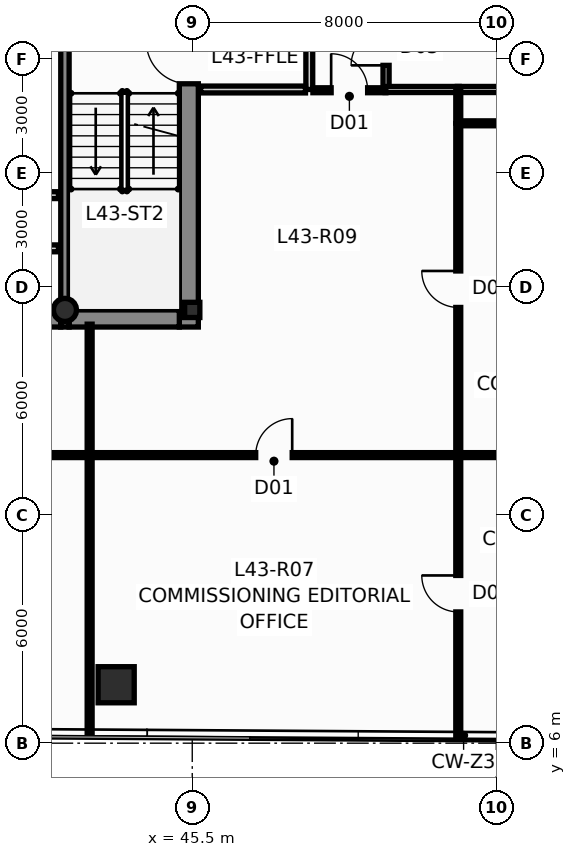
"""IFC4 building model, lengths in metres.
Left out: names, types, materials, properties, quantities, classifications, styles, units other than length and angle.
Written with IfcOpenShell. Run it as: python <this file> out.ifc"""

import sys

from ifc_helpers import new_model, si_unit, direction, frame, frame_2d, origin, origin_2d, place, context, subcontext, project, spatial, rectangle, hollow_rectangle, hollow_circle, i_section, extrude, source, transform, mapped, element, fill, save


model = new_model("IFC4")
c1 = context("Model", 3, precision=1e-05, world=origin(), true_north=direction((0.0, 1.0)))
c2 = subcontext(c1, "Body", "Model", "MODEL_VIEW")
j1 = project(units=[si_unit("LENGTHUNIT", "METRE"), si_unit("PLANEANGLEUNIT", "RADIAN")], contexts=[c1])
p1 = place(None, origin())
s1 = spatial("IfcSite", under=j1, at=p1, CompositionType="ELEMENT")
p2 = place(p1, origin())
s2 = spatial("IfcBuilding", under=s1, at=p2, CompositionType="ELEMENT")
p3 = place(p2, frame((0.0, 0.0, 165.8)))
s3 = spatial("IfcBuildingStorey", under=s2, at=p3, CompositionType="ELEMENT", Elevation=165.8)
m1 = source(origin(), c2, "Body", "SweptSolid", [
    extrude(i_section(OverallWidth=0.4, OverallDepth=0.4, WebThickness=0.02, FlangeThickness=0.032, at=origin_2d()), origin(), (0.0, 0.0, 1.0), 3.65),
])
p4 = place(p3, frame((45.5, 17.4, 0.0), z_axis=(0.0, 0.0, 1.0), x_axis=(1.0, 0.0, 0.0)))
e1 = element("IfcColumn", 1, at=p4, inside=s3, PredefinedType="COLUMN", context=c2, shape_type="MappedRepresentation", body=[
    mapped(m1, transform((0.0, 0.0, 0.0), scale=1.0)),
])
m2 = source(origin(), c2, "Body", "SweptSolid", [
    extrude(hollow_circle(Radius=0.305, WallThickness=0.025, at=origin_2d()), origin(), (0.0, 0.0, 1.0), 3.65),
])
p5 = place(p3, frame((42.15, 17.4, 0.0), z_axis=(0.0, 0.0, 1.0), x_axis=(1.0, 0.0, 0.0)))
e2 = element("IfcColumn", 2, at=p5, inside=s3, PredefinedType="COLUMN", context=c2, shape_type="MappedRepresentation", body=[
    mapped(m2, transform((0.0, 0.0, 0.0), scale=1.0)),
])
p6 = place(p3, frame((45.41, 16.95, 0.0), z_axis=(0.0, 0.0, 1.0), x_axis=(0.0, 1.0, 0.0)))
e3 = element("IfcWall", 3, at=p6, inside=s3, PredefinedType="SHEAR", context=c2, shape_type="SweptSolid", body=[
    extrude(rectangle(XDim=13.275, YDim=0.5, at=frame_2d((6.638, 0.0))), origin(), (0.0, 0.0, 1.0), 3.65),
])
p7 = place(p6, frame((6.4, 0.0, 0.0)))
e4 = element("IfcOpeningElement", 4, at=p7, cuts=e3, PredefinedType="OPENING", context=c2, shape_type="SweptSolid", body=[
    extrude(rectangle(XDim=1.12, YDim=2.15, at=frame_2d((0.56, 1.075))), frame((0.0, 0.262, 0.0), z_axis=(0.0, -1.0, 0.0), x_axis=(1.0, 0.0, 0.0)), (0.0, 0.0, 1.0), 0.524),
])
p8 = place(p6, frame((10.85, 0.0, 0.0)))
e5 = element("IfcOpeningElement", 5, at=p8, cuts=e3, PredefinedType="OPENING", context=c2, shape_type="SweptSolid", body=[
    extrude(rectangle(XDim=1.2, YDim=2.2, at=frame_2d((0.6, 1.1))), frame((0.0, 0.262, 0.0), z_axis=(0.0, -1.0, 0.0), x_axis=(1.0, 0.0, 0.0)), (0.0, 0.0, 1.0), 0.524),
])
p9 = place(p3, frame((33.96, 17.175, 0.0), z_axis=(0.0, 0.0, 1.0), x_axis=(1.0, 0.0, 0.0)))
e6 = element("IfcWall", 6, at=p9, inside=s3, PredefinedType="SHEAR", context=c2, shape_type="SweptSolid", body=[
    extrude(rectangle(XDim=8.08, YDim=0.45, at=frame_2d((4.04, 0.0))), origin(), (0.0, 0.0, 1.0), 3.65),
])
p10 = place(p3, frame((42.26, 17.175, 0.0), z_axis=(0.0, 0.0, 1.0), x_axis=(1.0, 0.0, 0.0)))
e7 = element("IfcWall", 7, at=p10, inside=s3, PredefinedType="SHEAR", context=c2, shape_type="SweptSolid", body=[
    extrude(rectangle(XDim=2.9, YDim=0.45, at=frame_2d((1.45, 0.0))), origin(), (0.0, 0.0, 1.0), 3.65),
])
p11 = place(p3, frame((42.15, 16.95, 0.0), z_axis=(0.0, 0.0, 1.0), x_axis=(0.0, 1.0, 0.0)))
e8 = element("IfcWall", 8, at=p11, inside=s3, PredefinedType="SHEAR", context=c2, shape_type="SweptSolid", body=[
    extrude(rectangle(XDim=13.275, YDim=0.22, at=frame_2d((6.638, 0.0))), origin(), (0.0, 0.0, 1.0), 3.65),
])
m3 = source(origin(), c2, "Body", "SweptSolid", [
    extrude(hollow_rectangle(XDim=0.95, YDim=0.95, WallThickness=0.05, at=origin_2d()), origin(), (0.0, 0.0, 1.0), 3.651),
])
p12 = place(p3, frame((43.498, 7.537, 0.0), z_axis=(0.004547556686, 0.019795246753, 0.99979371269), x_axis=(-0.974612694662, 0.223897510936, 0.0)))
e9 = element("IfcColumn", 9, at=p12, inside=s3, PredefinedType="COLUMN", context=c2, shape_type="MappedRepresentation", body=[
    mapped(m3, transform((0.0, 0.0, 0.0), scale=1.0)),
])
p13 = place(p3, frame((48.58, 23.2, 0.0), z_axis=(0.0, 0.0, 1.0), x_axis=(0.0, 1.0, 0.0)))
e10 = element("IfcWall", 10, at=p13, inside=s3, PredefinedType="PARTITIONING", context=c2, shape_type="SweptSolid", body=[
    extrude(rectangle(XDim=6.4, YDim=0.18, at=frame_2d((3.2, 0.0))), origin(), (0.0, 0.0, 1.0), 3.078),
])
p14 = place(p13, frame((2.65, 0.0, 0.0)))
e11 = element("IfcOpeningElement", 11, at=p14, cuts=e10, PredefinedType="OPENING", context=c2, shape_type="SweptSolid", body=[
    extrude(rectangle(XDim=1.05, YDim=2.15, at=frame_2d((0.525, 1.075))), frame((0.0, 0.102, 0.0), z_axis=(0.0, -1.0, 0.0), x_axis=(1.0, 0.0, 0.0)), (0.0, 0.0, 1.0), 0.204),
])
p15 = place(p3, frame((45.72, 23.2, 0.0), z_axis=(0.0, 0.0, 1.0), x_axis=(1.0, 0.0, 0.0)))
e12 = element("IfcWall", 12, at=p15, inside=s3, PredefinedType="PARTITIONING", context=c2, shape_type="SweptSolid", body=[
    extrude(rectangle(XDim=2.76, YDim=0.18, at=frame_2d((1.38, 0.0))), origin(), (0.0, 0.0, 1.0), 3.4),
])
p16 = place(p3, frame((40.22, 20.42, 0.0), z_axis=(0.0, 0.0, 1.0), x_axis=(1.0, 0.0, 0.0)))
e13 = element("IfcWall", 13, at=p16, inside=s3, PredefinedType="PARTITIONING", context=c2, shape_type="SweptSolid", body=[
    extrude(rectangle(XDim=1.76, YDim=0.18, at=frame_2d((0.88, 0.0))), origin(), (0.0, 0.0, 1.0), 3.4),
])
p17 = place(p3, frame((40.28, 19.02, 0.0), z_axis=(0.0, 0.0, 1.0), x_axis=(1.0, 0.0, 0.0)))
e14 = element("IfcWall", 14, at=p17, inside=s3, PredefinedType="PARTITIONING", context=c2, shape_type="SweptSolid", body=[
    extrude(rectangle(XDim=1.7, YDim=0.18, at=frame_2d((0.85, 0.0))), origin(), (0.0, 0.0, 1.0), 3.4),
])
p18 = place(p3, frame((50.6, 23.175, 0.0), z_axis=(0.0, 0.0, 1.0), x_axis=(0.0, 1.0, 0.0)))
e15 = element("IfcWall", 15, at=p18, inside=s3, PredefinedType="PLUMBINGWALL", context=c2, shape_type="SweptSolid", body=[
    extrude(rectangle(XDim=2.3, YDim=0.16, at=frame_2d((1.15, 0.0))), origin(), (0.0, 0.0, 1.0), 3.078),
])
p19 = place(p18, frame((0.66, 0.0, 0.0)))
e16 = element("IfcOpeningElement", 16, at=p19, cuts=e15, PredefinedType="OPENING", context=c2, shape_type="SweptSolid", body=[
    extrude(rectangle(XDim=0.92, YDim=2.1, at=frame_2d((0.46, 1.05))), frame((0.0, 0.092, 0.0), z_axis=(0.0, -1.0, 0.0), x_axis=(1.0, 0.0, 0.0)), (0.0, 0.0, 1.0), 0.184),
])
p20 = place(p3, frame((50.575, 23.2, 0.0), z_axis=(0.0, 0.0, 1.0), x_axis=(1.0, 0.0, 0.0)))
e17 = element("IfcWall", 17, at=p20, inside=s3, PredefinedType="PLUMBINGWALL", context=c2, shape_type="SweptSolid", body=[
    extrude(rectangle(XDim=1.95, YDim=0.16, at=frame_2d((0.975, 0.0))), origin(), (0.0, 0.0, 1.0), 3.4),
])
p21 = place(p3, frame((52.475, 23.2, 0.0), z_axis=(0.0, 0.0, 1.0), x_axis=(1.0, 0.0, 0.0)))
e18 = element("IfcWall", 18, at=p21, inside=s3, PredefinedType="PLUMBINGWALL", context=c2, shape_type="SweptSolid", body=[
    extrude(rectangle(XDim=1.35, YDim=0.16, at=frame_2d((0.675, 0.0))), origin(), (0.0, 0.0, 1.0), 3.4),
])
p22 = place(p3, frame((52.505, 13.58, 0.0), z_axis=(0.0, 0.0, 1.0), x_axis=(1.0, 0.0, 0.0)))
e19 = element("IfcWall", 19, at=p22, inside=s3, PredefinedType="PARTITIONING", context=c2, shape_type="SweptSolid", body=[
    extrude(rectangle(XDim=12.027, YDim=0.13, at=frame_2d((6.013, 0.0))), origin(), (0.0, 0.0, 1.0), 3.4),
])
p23 = place(p3, frame((42.805, 13.58, 0.0), z_axis=(0.0, 0.0, 1.0), x_axis=(1.0, 0.0, 0.0)))
e20 = element("IfcWall", 20, at=p23, inside=s3, PredefinedType="PARTITIONING", context=c2, shape_type="SweptSolid", body=[
    extrude(rectangle(XDim=9.69, YDim=0.13, at=frame_2d((4.845, 0.0))), origin(), (0.0, 0.0, 1.0), 3.078),
])
p24 = place(p23, frame((4.365, 0.0, 0.0)))
e21 = element("IfcOpeningElement", 21, at=p24, cuts=e20, PredefinedType="OPENING", context=c2, shape_type="SweptSolid", body=[
    extrude(rectangle(XDim=0.96, YDim=2.15, at=frame_2d((0.48, 1.075))), frame((0.0, 0.077, 0.0), z_axis=(0.0, -1.0, 0.0), x_axis=(1.0, 0.0, 0.0)), (0.0, 0.0, 1.0), 0.154),
])
p25 = place(p3, frame((33.205, 13.58, 0.0), z_axis=(0.0, 0.0, 1.0), x_axis=(1.0, 0.0, 0.0)))
e22 = element("IfcWall", 22, at=p25, inside=s3, PredefinedType="PARTITIONING", context=c2, shape_type="SweptSolid", body=[
    extrude(rectangle(XDim=9.59, YDim=0.13, at=frame_2d((4.795, 0.0))), origin(), (0.0, 0.0, 1.0), 3.078),
])
p26 = place(p25, frame((4.315, 0.0, 0.0)))
e23 = element("IfcOpeningElement", 23, at=p26, cuts=e22, PredefinedType="OPENING", context=c2, shape_type="SweptSolid", body=[
    extrude(rectangle(XDim=0.96, YDim=2.15, at=frame_2d((0.48, 1.075))), frame((0.0, 0.077, 0.0), z_axis=(0.0, -1.0, 0.0), x_axis=(1.0, 0.0, 0.0)), (0.0, 0.0, 1.0), 0.154),
])
p27 = place(p3, frame((52.5, 13.585, 0.0), z_axis=(0.0, 0.0, 1.0), x_axis=(0.0, 1.0, 0.0)))
e24 = element("IfcWall", 24, at=p27, inside=s3, PredefinedType="PARTITIONING", context=c2, shape_type="SweptSolid", body=[
    extrude(rectangle(XDim=8.72, YDim=0.13, at=frame_2d((4.36, 0.0))), origin(), (0.0, 0.0, 1.0), 3.078),
])
p28 = place(p27, frame((3.88, 0.0, 0.0)))
e25 = element("IfcOpeningElement", 25, at=p28, cuts=e24, PredefinedType="OPENING", context=c2, shape_type="SweptSolid", body=[
    extrude(rectangle(XDim=0.96, YDim=2.15, at=frame_2d((0.48, 1.075))), frame((0.0, 0.077, 0.0), z_axis=(0.0, -1.0, 0.0), x_axis=(1.0, 0.0, 0.0)), (0.0, 0.0, 1.0), 0.154),
])
p29 = place(p3, frame((52.5, 6.201, 0.0), z_axis=(0.0, 0.0, 1.0), x_axis=(0.0, 1.0, 0.0)))
e26 = element("IfcWall", 26, at=p29, inside=s3, PredefinedType="PARTITIONING", context=c2, shape_type="SweptSolid", body=[
    extrude(rectangle(XDim=7.374, YDim=0.13, at=frame_2d((3.687, 0.0))), origin(), (0.0, 0.0, 1.0), 3.4),
])
p30 = place(p29, frame((3.252, 0.0, 0.0)))
e27 = element("IfcOpeningElement", 27, at=p30, cuts=e26, PredefinedType="OPENING", context=c2, shape_type="SweptSolid", body=[
    extrude(rectangle(XDim=0.96, YDim=2.15, at=frame_2d((0.48, 1.075))), frame((0.0, 0.077, 0.0), z_axis=(0.0, -1.0, 0.0), x_axis=(1.0, 0.0, 0.0)), (0.0, 0.0, 1.0), 0.154),
])
p31 = place(p3, frame((42.8, 6.265, 0.0), z_axis=(0.0, 0.0, 1.0), x_axis=(0.0, 1.0, 0.0)))
e28 = element("IfcWall", 28, at=p31, inside=s3, PredefinedType="PARTITIONING", context=c2, shape_type="SweptSolid", body=[
    extrude(rectangle(XDim=7.31, YDim=0.13, at=frame_2d((3.655, 0.0))), origin(), (0.0, 0.0, 1.0), 3.4),
])
p32 = place(p3, frame((52.505, 22.31, 0.0), z_axis=(0.0, 0.0, 1.0), x_axis=(1.0, 0.0, 0.0)))
e29 = element("IfcWall", 29, at=p32, inside=s3, PredefinedType="PARTITIONING", context=c2, shape_type="SweptSolid", body=[
    extrude(rectangle(XDim=6.801, YDim=0.13, at=frame_2d((3.4, 0.0))), origin(), (0.0, 0.0, 1.0), 3.4),
])
p33 = place(p32, frame((2.972, 0.0, 0.0)))
e30 = element("IfcOpeningElement", 30, at=p33, cuts=e29, PredefinedType="OPENING", context=c2, shape_type="SweptSolid", body=[
    extrude(rectangle(XDim=0.96, YDim=2.15, at=frame_2d((0.48, 1.075))), frame((0.0, 0.077, 0.0), z_axis=(0.0, -1.0, 0.0), x_axis=(1.0, 0.0, 0.0)), (0.0, 0.0, 1.0), 0.154),
])
p34 = place(p3, frame((42.8, 13.585, 0.0), z_axis=(0.0, 0.0, 1.0), x_axis=(0.0, 1.0, 0.0)))
e31 = element("IfcWall", 31, at=p34, inside=s3, PredefinedType="PARTITIONING", context=c2, shape_type="SweptSolid", body=[
    extrude(rectangle(XDim=3.44, YDim=0.13, at=frame_2d((1.72, 0.0))), origin(), (0.0, 0.0, 1.0), 3.4),
])
p35 = place(p3, frame((48.675, 23.18, 0.0), z_axis=(0.0, 0.0, 1.0), x_axis=(1.0, 0.0, 0.0)))
e32 = element("IfcWall", 32, at=p35, inside=s3, PredefinedType="PARTITIONING", context=c2, shape_type="SweptSolid", body=[
    extrude(rectangle(XDim=1.92, YDim=0.13, at=frame_2d((0.96, 0.0))), origin(), (0.0, 0.0, 1.0), 3.4),
])
p36 = place(p35, frame((0.48, 0.0, 0.0)))
e33 = element("IfcOpeningElement", 33, at=p36, cuts=e32, PredefinedType="OPENING", context=c2, shape_type="SweptSolid", body=[
    extrude(rectangle(XDim=0.96, YDim=2.15, at=frame_2d((0.48, 1.075))), frame((0.0, 0.077, 0.0), z_axis=(0.0, -1.0, 0.0), x_axis=(1.0, 0.0, 0.0)), (0.0, 0.0, 1.0), 0.154),
])
p37 = place(p3, frame((52.5, 22.315, 0.0), z_axis=(0.0, 0.0, 1.0), x_axis=(0.0, 1.0, 0.0)))
e34 = element("IfcWall", 34, at=p37, inside=s3, PredefinedType="PARTITIONING", context=c2, shape_type="SweptSolid", body=[
    extrude(rectangle(XDim=0.88, YDim=0.13, at=frame_2d((0.44, 0.0))), origin(), (0.0, 0.0, 1.0), 3.078),
])
p38 = place(p7, origin())
e35 = element("IfcDoor", 35, at=p38, inside=s3, OperationType="SINGLE_SWING_RIGHT", PredefinedType="DOOR", context=c2, shape_type="SweptSolid", body=[
    extrude(rectangle(XDim=1.12, YDim=2.15, at=frame_2d((0.56, 1.075))), frame((0.0, 0.025, 0.0), z_axis=(0.0, -1.0, 0.0), x_axis=(1.0, 0.0, 0.0)), (0.0, 0.0, 1.0), 0.05),
])
fill(e4, e35)
p39 = place(p19, origin())
e36 = element("IfcDoor", 36, at=p39, inside=s3, OperationType="SINGLE_SWING_LEFT", PredefinedType="DOOR", context=c2, shape_type="SweptSolid", body=[
    extrude(rectangle(XDim=0.92, YDim=2.1, at=frame_2d((0.46, 1.05))), frame((0.0, 0.025, 0.0), z_axis=(0.0, -1.0, 0.0), x_axis=(1.0, 0.0, 0.0)), (0.0, 0.0, 1.0), 0.05),
])
fill(e16, e36)
p40 = place(p24, origin())
e37 = element("IfcDoor", 37, at=p40, inside=s3, OperationType="SINGLE_SWING_RIGHT", PredefinedType="DOOR", context=c2, shape_type="SweptSolid", body=[
    extrude(rectangle(XDim=0.96, YDim=2.15, at=frame_2d((0.48, 1.075))), frame((0.0, 0.025, 0.0), z_axis=(0.0, -1.0, 0.0), x_axis=(1.0, 0.0, 0.0)), (0.0, 0.0, 1.0), 0.05),
])
fill(e21, e37)
p41 = place(p28, origin())
e38 = element("IfcDoor", 38, at=p41, inside=s3, OperationType="SINGLE_SWING_RIGHT", PredefinedType="DOOR", context=c2, shape_type="SweptSolid", body=[
    extrude(rectangle(XDim=0.96, YDim=2.15, at=frame_2d((0.48, 1.075))), frame((0.0, 0.025, 0.0), z_axis=(0.0, -1.0, 0.0), x_axis=(1.0, 0.0, 0.0)), (0.0, 0.0, 1.0), 0.05),
])
fill(e25, e38)
p42 = place(p30, origin())
e39 = element("IfcDoor", 39, at=p42, inside=s3, OperationType="SINGLE_SWING_RIGHT", PredefinedType="DOOR", context=c2, shape_type="SweptSolid", body=[
    extrude(rectangle(XDim=0.96, YDim=2.15, at=frame_2d((0.48, 1.075))), frame((0.0, 0.025, 0.0), z_axis=(0.0, -1.0, 0.0), x_axis=(1.0, 0.0, 0.0)), (0.0, 0.0, 1.0), 0.05),
])
fill(e27, e39)
p43 = place(p36, origin())
e40 = element("IfcDoor", 40, at=p43, inside=s3, OperationType="SINGLE_SWING_LEFT", PredefinedType="DOOR", context=c2, shape_type="SweptSolid", body=[
    extrude(rectangle(XDim=0.96, YDim=2.15, at=frame_2d((0.48, 1.075))), frame((0.0, 0.025, 0.0), z_axis=(0.0, -1.0, 0.0), x_axis=(1.0, 0.0, 0.0)), (0.0, 0.0, 1.0), 0.05),
])
fill(e33, e40)
save(model, sys.argv[1])
